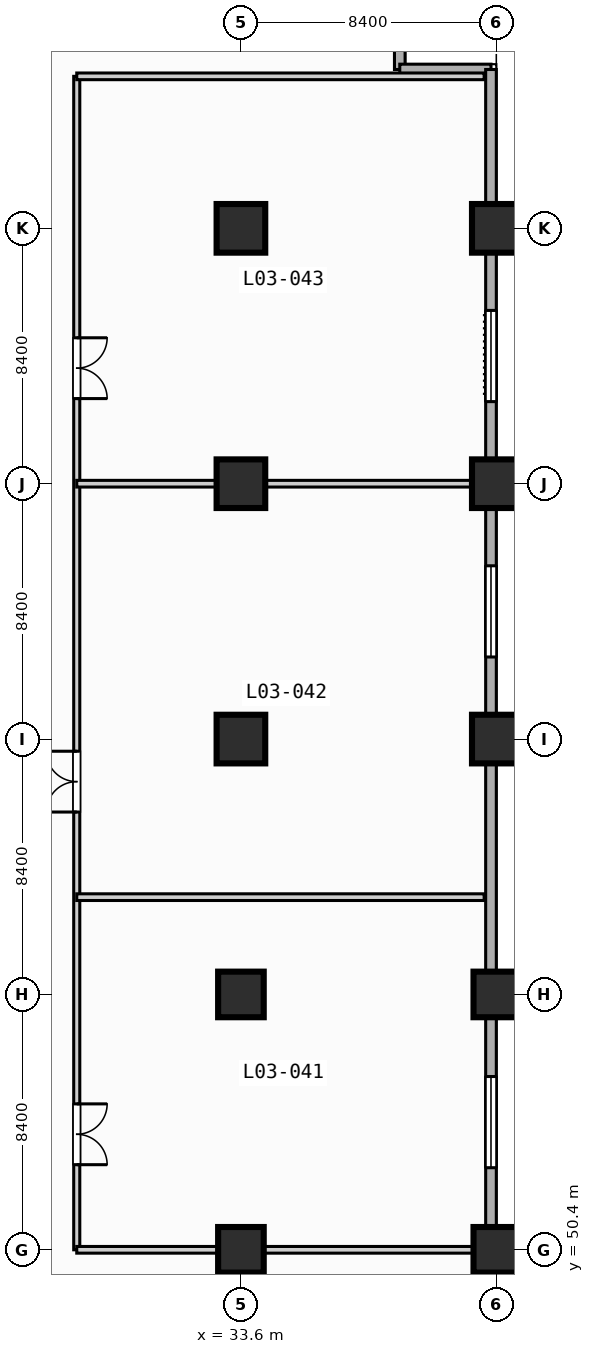
"""IFC4 building model, lengths in metres.
Left out: names, types, materials, properties, quantities, classifications, styles, units other than length and angle.
Written with IfcOpenShell. Run it as: python <this file> out.ifc"""

import sys

from ifc_helpers import new_model, si_unit, direction, frame, frame_2d, origin, origin_2d, place, context, subcontext, project, spatial, rectangle, extrude, element, fill, save


model = new_model("IFC4")
c1 = context("Model", 3, precision=1e-05, world=origin(), true_north=direction((0.0, 1.0)))
c2 = subcontext(c1, "Body", "Model", "MODEL_VIEW")
j1 = project(units=[si_unit("LENGTHUNIT", "METRE"), si_unit("PLANEANGLEUNIT", "RADIAN")], contexts=[c1])
p1 = place(None, origin())
s1 = spatial("IfcSite", under=j1, at=p1, CompositionType="ELEMENT")
p2 = place(p1, origin())
s2 = spatial("IfcBuilding", under=s1, at=p2, CompositionType="ELEMENT")
p3 = place(p2, frame((0.0, 0.0, 15.6)))
s3 = spatial("IfcBuildingStorey", under=s2, at=p3, CompositionType="ELEMENT", Elevation=15.6)
for number, where, z_axis, x_axis in (
    (1, (33.6, 50.4, 0.0), (0.0, 0.0, 1.0), (1.0, 0.0, 0.0)),
    (2, (33.6, 58.8, 0.0), (0.0, 0.0, 1.0), (1.0, 0.0, 0.0)),
):
    element("IfcColumn", number, at=place(p3, frame(where, z_axis=z_axis, x_axis=x_axis)), inside=s3, PredefinedType="COLUMN", context=c2, shape_type="SweptSolid", body=[
        extrude(rectangle(XDim=1.5, YDim=1.5, at=origin_2d()), origin(), (0.0, 0.0, 1.0), 5.2),
    ])
for number, where, z_axis, x_axis in (
    (3, (33.6, 67.2, 0.0), (0.0, 0.0, 1.0), (1.0, 0.0, 0.0)),
    (4, (33.6, 75.6, 0.0), (0.0, 0.0, 1.0), (1.0, 0.0, 0.0)),
    (5, (33.6, 84.0, 0.0), (0.0, 0.0, 1.0), (1.0, 0.0, 0.0)),
):
    element("IfcColumn", number, at=place(p3, frame(where, z_axis=z_axis, x_axis=x_axis)), inside=s3, PredefinedType="COLUMN", context=c2, shape_type="SweptSolid", body=[
        extrude(rectangle(XDim=1.6, YDim=1.6, at=origin_2d()), origin(), (0.0, 0.0, 1.0), 5.2),
    ])
for number, where, z_axis, x_axis in (
    (6, (42.0, 50.4, 0.0), (0.0, 0.0, 1.0), (1.0, 0.0, 0.0)),
    (7, (42.0, 58.8, 0.0), (0.0, 0.0, 1.0), (1.0, 0.0, 0.0)),
):
    element("IfcColumn", number, at=place(p3, frame(where, z_axis=z_axis, x_axis=x_axis)), inside=s3, PredefinedType="COLUMN", context=c2, shape_type="SweptSolid", body=[
        extrude(rectangle(XDim=1.5, YDim=1.5, at=origin_2d()), origin(), (0.0, 0.0, 1.0), 5.2),
    ])
for number, where, z_axis, x_axis in (
    (8, (42.0, 67.2, 0.0), (0.0, 0.0, 1.0), (1.0, 0.0, 0.0)),
    (9, (42.0, 75.6, 0.0), (0.0, 0.0, 1.0), (1.0, 0.0, 0.0)),
    (10, (42.0, 84.0, 0.0), (0.0, 0.0, 1.0), (1.0, 0.0, 0.0)),
):
    element("IfcColumn", number, at=place(p3, frame(where, z_axis=z_axis, x_axis=x_axis)), inside=s3, PredefinedType="COLUMN", context=c2, shape_type="SweptSolid", body=[
        extrude(rectangle(XDim=1.6, YDim=1.6, at=origin_2d()), origin(), (0.0, 0.0, 1.0), 5.2),
    ])
for number, where, z_axis, x_axis in (
    (11, (38.825, 92.225, 0.0), (0.0, 0.0, 1.0), (0.0, -1.0, 0.0)),
    (12, (38.825, 89.225, 0.0), (0.0, 0.0, 1.0), (1.0, 0.0, 0.0)),
):
    element("IfcWall", number, at=place(p3, frame(where, z_axis=z_axis, x_axis=x_axis)), inside=s3, PredefinedType="STANDARD", context=c2, shape_type="SweptSolid", body=[
        extrude(rectangle(XDim=3.0, YDim=0.35, at=frame_2d((1.5, 0.0))), origin(), (0.0, 0.0, 1.0), 4.85),
    ])
p4 = place(p3, frame((41.825, 89.225, 0.0), z_axis=(0.0, 0.0, 1.0), x_axis=(0.0, -1.0, 0.0)))
e13 = element("IfcWall", 13, at=p4, inside=s3, PredefinedType="STANDARD", context=c2, shape_type="SweptSolid", body=[
    extrude(rectangle(XDim=47.4, YDim=0.35, at=frame_2d((23.7, 0.0))), origin(), (0.0, 0.0, 1.0), 4.85),
])
p5 = place(p4, frame((33.125, 0.0, 0.85)))
e14 = element("IfcOpeningElement", 14, at=p5, cuts=e13, PredefinedType="OPENING", context=c2, shape_type="SweptSolid", body=[
    extrude(rectangle(XDim=3.0, YDim=2.4, at=frame_2d((1.5, 1.2))), frame((0.0, 0.185, 0.0), z_axis=(0.0, -1.0, 0.0), x_axis=(1.0, 0.0, 0.0)), (0.0, 0.0, 1.0), 0.37),
])
p6 = place(p4, frame((16.325, 0.0, 0.85)))
e15 = element("IfcOpeningElement", 15, at=p6, cuts=e13, PredefinedType="OPENING", context=c2, shape_type="SweptSolid", body=[
    extrude(rectangle(XDim=3.0, YDim=2.4, at=frame_2d((1.5, 1.2))), frame((0.0, 0.185, 0.0), z_axis=(0.0, -1.0, 0.0), x_axis=(1.0, 0.0, 0.0)), (0.0, 0.0, 1.0), 0.37),
])
p7 = place(p4, frame((7.925, 0.0, 0.85)))
e16 = element("IfcOpeningElement", 16, at=p7, cuts=e13, PredefinedType="OPENING", context=c2, shape_type="SweptSolid", body=[
    extrude(rectangle(XDim=3.0, YDim=2.4, at=frame_2d((1.5, 1.2))), frame((0.0, 0.185, 0.0), z_axis=(0.0, -1.0, 0.0), x_axis=(1.0, 0.0, 0.0)), (0.0, 0.0, 1.0), 0.37),
])
p8 = place(p3, frame((28.2, 50.4, 0.0), z_axis=(0.0, 0.0, 1.0), x_axis=(0.0, 1.0, 0.0)))
e17 = element("IfcWall", 17, at=p8, inside=s3, PredefinedType="PARTITIONING", context=c2, shape_type="SweptSolid", body=[
    extrude(rectangle(XDim=38.6, YDim=0.2, at=frame_2d((19.3, 0.0))), origin(), (0.0, 0.0, 1.0), 4.85),
])
p9 = place(p8, frame((2.8, 0.0, 0.0)))
e18 = element("IfcOpeningElement", 18, at=p9, cuts=e17, PredefinedType="OPENING", context=c2, shape_type="SweptSolid", body=[
    extrude(rectangle(XDim=2.0, YDim=2.15, at=frame_2d((1.0, 1.075))), frame((0.0, 0.11, 0.0), z_axis=(0.0, -1.0, 0.0), x_axis=(1.0, 0.0, 0.0)), (0.0, 0.0, 1.0), 0.22),
])
p10 = place(p8, frame((14.4, 0.0, 0.0)))
e19 = element("IfcOpeningElement", 19, at=p10, cuts=e17, PredefinedType="OPENING", context=c2, shape_type="SweptSolid", body=[
    extrude(rectangle(XDim=2.0, YDim=2.15, at=frame_2d((1.0, 1.075))), frame((0.0, 0.11, 0.0), z_axis=(0.0, -1.0, 0.0), x_axis=(1.0, 0.0, 0.0)), (0.0, 0.0, 1.0), 0.22),
])
p11 = place(p8, frame((28.0, 0.0, 0.0)))
e20 = element("IfcOpeningElement", 20, at=p11, cuts=e17, PredefinedType="OPENING", context=c2, shape_type="SweptSolid", body=[
    extrude(rectangle(XDim=2.0, YDim=2.15, at=frame_2d((1.0, 1.075))), frame((0.0, 0.11, 0.0), z_axis=(0.0, -1.0, 0.0), x_axis=(1.0, 0.0, 0.0)), (0.0, 0.0, 1.0), 0.22),
])
p12 = place(p3, frame((28.2, 50.4, 0.0), z_axis=(0.0, 0.0, 1.0), x_axis=(1.0, 0.0, 0.0)))
e21 = element("IfcWall", 21, at=p12, inside=s3, PredefinedType="PARTITIONING", context=c2, shape_type="SweptSolid", body=[
    extrude(rectangle(XDim=13.4, YDim=0.22, at=frame_2d((6.7, 0.0))), origin(), (0.0, 0.0, 1.0), 4.0),
])
p13 = place(p3, frame((28.2, 62.0, 0.0), z_axis=(0.0, 0.0, 1.0), x_axis=(1.0, 0.0, 0.0)))
e22 = element("IfcWall", 22, at=p13, inside=s3, PredefinedType="PARTITIONING", context=c2, shape_type="SweptSolid", body=[
    extrude(rectangle(XDim=13.4, YDim=0.22, at=frame_2d((6.7, 0.0))), origin(), (0.0, 0.0, 1.0), 4.85),
])
p14 = place(p3, frame((28.2, 75.6, 0.0), z_axis=(0.0, 0.0, 1.0), x_axis=(1.0, 0.0, 0.0)))
e23 = element("IfcWall", 23, at=p14, inside=s3, PredefinedType="PARTITIONING", context=c2, shape_type="SweptSolid", body=[
    extrude(rectangle(XDim=13.4, YDim=0.22, at=frame_2d((6.7, 0.0))), origin(), (0.0, 0.0, 1.0), 4.0),
])
p15 = place(p3, frame((28.2, 89.0, 0.0), z_axis=(0.0, 0.0, 1.0), x_axis=(1.0, 0.0, 0.0)))
e24 = element("IfcWall", 24, at=p15, inside=s3, PredefinedType="PARTITIONING", context=c2, shape_type="SweptSolid", body=[
    extrude(rectangle(XDim=13.4, YDim=0.22, at=frame_2d((6.7, 0.0))), origin(), (0.0, 0.0, 1.0), 4.85),
])
p16 = place(p5, origin())
e25 = element("IfcWindow", 25, at=p16, inside=s3, PartitioningType="SINGLE_PANEL", PredefinedType="WINDOW", context=c2, shape_type="SweptSolid", body=[
    extrude(rectangle(XDim=3.0, YDim=2.4, at=frame_2d((1.5, 1.2))), frame((0.0, 0.03, 0.0), z_axis=(0.0, -1.0, 0.0), x_axis=(1.0, 0.0, 0.0)), (0.0, 0.0, 1.0), 0.06),
])
fill(e14, e25)
p17 = place(p6, origin())
e26 = element("IfcWindow", 26, at=p17, inside=s3, PartitioningType="SINGLE_PANEL", PredefinedType="WINDOW", context=c2, shape_type="SweptSolid", body=[
    extrude(rectangle(XDim=3.0, YDim=2.4, at=frame_2d((1.5, 1.2))), frame((0.0, 0.03, 0.0), z_axis=(0.0, -1.0, 0.0), x_axis=(1.0, 0.0, 0.0)), (0.0, 0.0, 1.0), 0.06),
])
fill(e15, e26)
p18 = place(p7, origin())
e27 = element("IfcWindow", 27, at=p18, inside=s3, PartitioningType="SINGLE_PANEL", PredefinedType="WINDOW", context=c2, shape_type="SweptSolid", body=[
    extrude(rectangle(XDim=3.0, YDim=2.4, at=frame_2d((1.5, 1.2))), frame((0.0, 0.03, 0.0), z_axis=(0.0, -1.0, 0.0), x_axis=(1.0, 0.0, 0.0)), (0.0, 0.0, 1.0), 0.06),
])
fill(e16, e27)
p19 = place(p9, origin())
e28 = element("IfcDoor", 28, at=p19, inside=s3, OperationType="SINGLE_SWING_RIGHT", PredefinedType="DOOR", context=c2, shape_type="SweptSolid", body=[
    extrude(rectangle(XDim=2.0, YDim=2.15, at=frame_2d((1.0, 1.075))), frame((0.0, 0.025, 0.0), z_axis=(0.0, -1.0, 0.0), x_axis=(1.0, 0.0, 0.0)), (0.0, 0.0, 1.0), 0.05),
])
fill(e18, e28)
p20 = place(p10, origin())
e29 = element("IfcDoor", 29, at=p20, inside=s3, OperationType="SINGLE_SWING_LEFT", PredefinedType="DOOR", context=c2, shape_type="SweptSolid", body=[
    extrude(rectangle(XDim=2.0, YDim=2.15, at=frame_2d((1.0, 1.075))), frame((0.0, 0.025, 0.0), z_axis=(0.0, -1.0, 0.0), x_axis=(1.0, 0.0, 0.0)), (0.0, 0.0, 1.0), 0.05),
])
fill(e19, e29)
p21 = place(p11, origin())
e30 = element("IfcDoor", 30, at=p21, inside=s3, OperationType="SINGLE_SWING_RIGHT", PredefinedType="DOOR", context=c2, shape_type="SweptSolid", body=[
    extrude(rectangle(XDim=2.0, YDim=2.15, at=frame_2d((1.0, 1.075))), frame((0.0, 0.025, 0.0), z_axis=(0.0, -1.0, 0.0), x_axis=(1.0, 0.0, 0.0)), (0.0, 0.0, 1.0), 0.05),
])
fill(e20, e30)
save(model, sys.argv[1])
